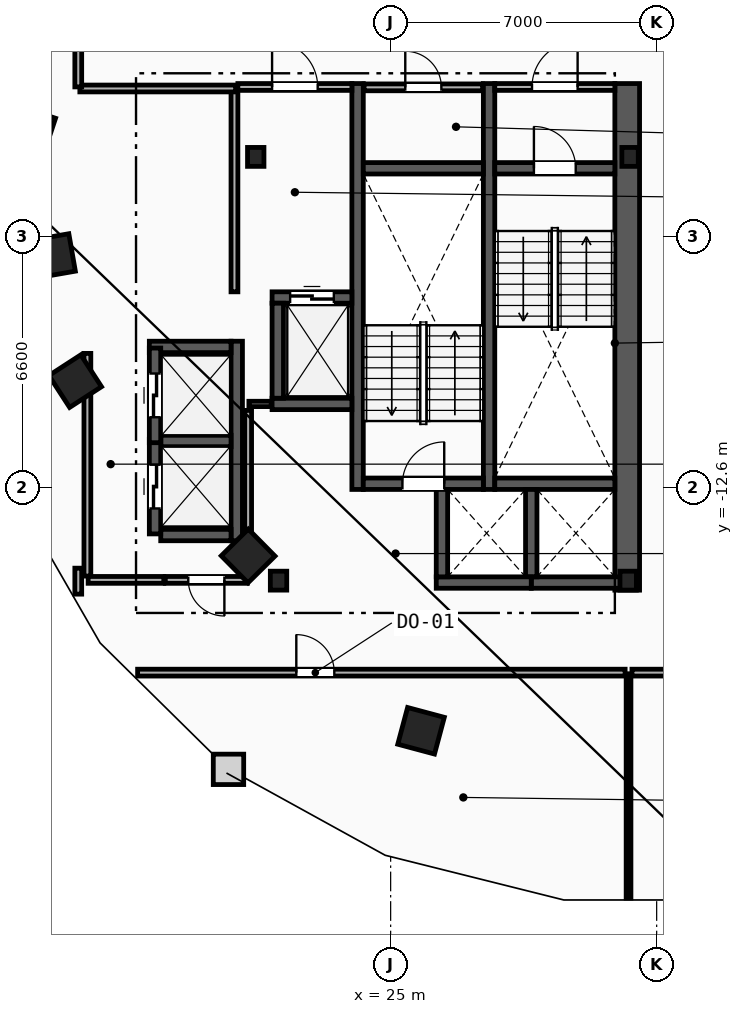
"""IFC4 building model, lengths in metres.
Left out: names, types, materials, properties, quantities, classifications, styles, units other than length and angle.
Written with IfcOpenShell. Run it as: python <this file> out.ifc"""

import sys

from ifc_helpers import new_model, si_unit, direction, frame, frame_2d, origin, origin_2d, place, context, subcontext, project, spatial, rectangle, i_section, extrude, element, fill, save


model = new_model("IFC4")
c1 = context("Model", 3, precision=1e-05, world=origin(), true_north=direction((0.0, 1.0)))
c2 = subcontext(c1, "Body", "Model", "MODEL_VIEW")
j1 = project(units=[si_unit("LENGTHUNIT", "METRE"), si_unit("PLANEANGLEUNIT", "RADIAN")], contexts=[c1])
p1 = place(None, origin())
s1 = spatial("IfcSite", under=j1, at=p1, CompositionType="ELEMENT")
p2 = place(p1, origin())
s2 = spatial("IfcBuilding", under=s1, at=p2, CompositionType="ELEMENT")
p3 = place(p2, frame((0.0, 0.0, 180.0)))
s3 = spatial("IfcBuildingStorey", under=s2, at=p3, CompositionType="ELEMENT", Elevation=180.0)
for number, where, z_axis, x_axis in (
    (1, (31.3, -3.9, 0.0), (0.0, 0.0, 1.0), (1.0, 0.0, 0.0)),
    (2, (21.45, -3.9, 0.0), (0.0, 0.0, 1.0), (1.0, 0.0, 0.0)),
    (3, (22.05, -15.05, 0.0), (0.0, 0.0, 1.0), (1.0, 0.0, 0.0)),
    (4, (31.25, -15.05, 0.0), (0.0, 0.0, 1.0), (1.0, 0.0, 0.0)),
):
    element("IfcColumn", number, at=place(p3, frame(where, z_axis=z_axis, x_axis=x_axis)), inside=s3, PredefinedType="COLUMN", context=c2, shape_type="SweptSolid", body=[
        extrude(i_section(OverallWidth=0.432, OverallDepth=0.498, WebThickness=0.056, FlangeThickness=0.089, FilletRadius=0.018, at=origin_2d()), origin(), (0.0, 0.0, 1.0), 3.6),
    ])
for number, where, z_axis, x_axis in (
    (5, (15.55, -3.2, 0.0), (0.0, 0.0, 1.0), (-0.315, -0.949, 0.0)),
    (6, (16.125, -6.5, 0.0), (0.0, 0.0, 1.0), (0.172, -0.985, 0.0)),
    (7, (16.7, -9.8, 0.0), (0.0, 0.0, 1.0), (0.544, -0.839, 0.0)),
    (8, (21.25, -14.4, 0.0), (0.0, 0.0, 1.0), (0.703, -0.711, 0.0)),
    (9, (25.8, -19.0, 0.0), (0.0, 0.0, 1.0), (0.966, -0.259, 0.0)),
):
    element("IfcColumn", number, at=place(p3, frame(where, z_axis=z_axis, x_axis=x_axis)), inside=s3, PredefinedType="COLUMN", context=c2, shape_type="SweptSolid", body=[
        extrude(rectangle(XDim=1.0, YDim=1.0, at=origin_2d()), origin(), (0.0, 0.0, 1.0), 3.6),
    ])
p4 = place(p3, frame((31.225, -15.3, 0.0), z_axis=(0.0, 0.0, 1.0), x_axis=(0.0, 1.0, 0.0)))
e10 = element("IfcWall", 10, at=p4, inside=s3, PredefinedType="SHEAR", context=c2, shape_type="SweptSolid", body=[
    extrude(rectangle(XDim=13.33, YDim=0.65, at=frame_2d((6.665, 0.0))), origin(), (0.0, 0.0, 1.0), 3.36),
])
for number, where, z_axis, x_axis in (
    (11, (27.59, -12.65, 0.0), (0.0, 0.0, 1.0), (0.0, 1.0, 0.0)),
    (12, (24.13, -12.65, 0.0), (0.0, 0.0, 1.0), (0.0, 1.0, 0.0)),
):
    element("IfcWall", number, at=place(p3, frame(where, z_axis=z_axis, x_axis=x_axis)), inside=s3, PredefinedType="SHEAR", context=c2, shape_type="SweptSolid", body=[
        extrude(rectangle(XDim=10.68, YDim=0.3, at=frame_2d((5.34, 0.0))), origin(), (0.0, 0.0, 1.0), 3.36),
    ])
p5 = place(p3, frame((27.74, -4.2, 0.0), z_axis=(0.0, 0.0, 1.0), x_axis=(1.0, 0.0, 0.0)))
e13 = element("IfcWall", 13, at=p5, inside=s3, PredefinedType="SHEAR", context=c2, shape_type="SweptSolid", body=[
    extrude(rectangle(XDim=3.16, YDim=0.3, at=frame_2d((1.58, 0.0))), origin(), (0.0, 0.0, 1.0), 3.36),
])
p6 = place(p5, frame((1.03, 0.0, 0.0)))
e14 = element("IfcOpeningElement", 14, at=p6, cuts=e13, PredefinedType="OPENING", context=c2, shape_type="SweptSolid", body=[
    extrude(rectangle(XDim=1.1, YDim=2.15, at=frame_2d((0.55, 1.075))), frame((0.0, 0.16, 0.0), z_axis=(0.0, -1.0, 0.0), x_axis=(1.0, 0.0, 0.0)), (0.0, 0.0, 1.0), 0.32),
])
p7 = place(p3, frame((27.74, -12.5, 0.0), z_axis=(0.0, 0.0, 1.0), x_axis=(1.0, 0.0, 0.0)))
e15 = element("IfcWall", 15, at=p7, inside=s3, PredefinedType="SHEAR", context=c2, shape_type="SweptSolid", body=[
    extrude(rectangle(XDim=3.16, YDim=0.3, at=frame_2d((1.58, 0.0))), origin(), (0.0, 0.0, 1.0), 3.36),
])
p8 = place(p3, frame((24.28, -12.5, 0.0), z_axis=(0.0, 0.0, 1.0), x_axis=(1.0, 0.0, 0.0)))
e16 = element("IfcWall", 16, at=p8, inside=s3, PredefinedType="SHEAR", context=c2, shape_type="SweptSolid", body=[
    extrude(rectangle(XDim=3.16, YDim=0.3, at=frame_2d((1.58, 0.0))), origin(), (0.0, 0.0, 1.0), 3.36),
])
p9 = place(p8, frame((1.03, 0.0, 0.0)))
e17 = element("IfcOpeningElement", 17, at=p9, cuts=e16, PredefinedType="OPENING", context=c2, shape_type="SweptSolid", body=[
    extrude(rectangle(XDim=1.1, YDim=2.15, at=frame_2d((0.55, 1.075))), frame((0.0, 0.16, 0.0), z_axis=(0.0, -1.0, 0.0), x_axis=(1.0, 0.0, 0.0)), (0.0, 0.0, 1.0), 0.32),
])
p10 = place(p3, frame((24.28, -4.2, 0.0), z_axis=(0.0, 0.0, 1.0), x_axis=(1.0, 0.0, 0.0)))
e18 = element("IfcWall", 18, at=p10, inside=s3, PredefinedType="SHEAR", context=c2, shape_type="SweptSolid", body=[
    extrude(rectangle(XDim=3.16, YDim=0.3, at=frame_2d((1.58, 0.0))), origin(), (0.0, 0.0, 1.0), 3.36),
])
p11 = place(p3, frame((20.89, -7.45, 0.0), z_axis=(0.0, 0.0, 1.0), x_axis=(0.0, 1.0, 0.0)))
e19 = element("IfcWall", 19, at=p11, inside=s3, PredefinedType="PARTITIONING", context=c2, shape_type="SweptSolid", body=[
    extrude(rectangle(XDim=5.3, YDim=0.18, at=frame_2d((2.65, 0.0))), origin(), (0.0, 0.0, 1.0), 3.36),
])
p12 = place(p3, frame((20.98, -2.06, 0.0), z_axis=(0.0, 0.0, 1.0), x_axis=(1.0, 0.0, 0.0)))
e20 = element("IfcWall", 20, at=p12, inside=s3, PredefinedType="PARTITIONING", context=c2, shape_type="SweptSolid", body=[
    extrude(rectangle(XDim=3.0, YDim=0.18, at=frame_2d((1.5, 0.0))), origin(), (0.0, 0.0, 1.0), 3.36),
])
p13 = place(p12, frame((0.9, 0.0, 0.0)))
e21 = element("IfcOpeningElement", 21, at=p13, cuts=e20, PredefinedType="OPENING", context=c2, shape_type="SweptSolid", body=[
    extrude(rectangle(XDim=1.2, YDim=2.15, at=frame_2d((0.6, 1.075))), frame((0.0, 0.1, 0.0), z_axis=(0.0, -1.0, 0.0), x_axis=(1.0, 0.0, 0.0)), (0.0, 0.0, 1.0), 0.2),
])
p14 = place(p3, frame((27.74, -2.06, 0.0), z_axis=(0.0, 0.0, 1.0), x_axis=(1.0, 0.0, 0.0)))
e22 = element("IfcWall", 22, at=p14, inside=s3, PredefinedType="PARTITIONING", context=c2, shape_type="SweptSolid", body=[
    extrude(rectangle(XDim=3.16, YDim=0.18, at=frame_2d((1.58, 0.0))), origin(), (0.0, 0.0, 1.0), 3.36),
])
p15 = place(p14, frame((0.98, 0.0, 0.0)))
e23 = element("IfcOpeningElement", 23, at=p15, cuts=e22, PredefinedType="OPENING", context=c2, shape_type="SweptSolid", body=[
    extrude(rectangle(XDim=1.2, YDim=2.15, at=frame_2d((0.6, 1.075))), frame((0.0, 0.1, 0.0), z_axis=(0.0, -1.0, 0.0), x_axis=(1.0, 0.0, 0.0)), (0.0, 0.0, 1.0), 0.2),
])
p16 = place(p3, frame((21.88, -7.6, 0.0), z_axis=(0.0, 0.0, 1.0), x_axis=(1.0, 0.0, 0.0)))
e24 = element("IfcWall", 24, at=p16, inside=s3, PredefinedType="SHEAR", context=c2, shape_type="SweptSolid", body=[
    extrude(rectangle(XDim=2.1, YDim=0.3, at=frame_2d((1.05, 0.0))), origin(), (0.0, 0.0, 1.0), 3.36),
])
p17 = place(p16, frame((0.475, 0.0, 0.0)))
e25 = element("IfcOpeningElement", 25, at=p17, cuts=e24, PredefinedType="OPENING", context=c2, shape_type="SweptSolid", body=[
    extrude(rectangle(XDim=1.15, YDim=2.2, at=frame_2d((0.575, 1.1))), frame((0.0, 0.16, 0.0), z_axis=(0.0, -1.0, 0.0), x_axis=(1.0, 0.0, 0.0)), (0.0, 0.0, 1.0), 0.32),
])
p18 = place(p3, frame((21.88, -10.4, 0.0), z_axis=(0.0, 0.0, 1.0), x_axis=(1.0, 0.0, 0.0)))
e26 = element("IfcWall", 26, at=p18, inside=s3, PredefinedType="SHEAR", context=c2, shape_type="SweptSolid", body=[
    extrude(rectangle(XDim=2.1, YDim=0.3, at=frame_2d((1.05, 0.0))), origin(), (0.0, 0.0, 1.0), 3.36),
])
for number, where, z_axis, x_axis in (
    (27, (22.03, -10.25, 0.0), (0.0, 0.0, 1.0), (0.0, 1.0, 0.0)),
    (28, (28.7, -15.1, 0.0), (0.0, 0.0, 1.0), (1.0, 0.0, 0.0)),
):
    element("IfcWall", number, at=place(p3, frame(where, z_axis=z_axis, x_axis=x_axis)), inside=s3, PredefinedType="SHEAR", context=c2, shape_type="SweptSolid", body=[
        extrude(rectangle(XDim=2.5, YDim=0.3, at=frame_2d((1.25, 0.0))), origin(), (0.0, 0.0, 1.0), 3.36),
    ])
p19 = place(p3, frame((28.7, -14.95, 0.0), z_axis=(0.0, 0.0, 1.0), x_axis=(0.0, 1.0, 0.0)))
e29 = element("IfcWall", 29, at=p19, inside=s3, PredefinedType="SHEAR", context=c2, shape_type="SweptSolid", body=[
    extrude(rectangle(XDim=2.3, YDim=0.3, at=frame_2d((1.15, 0.0))), origin(), (0.0, 0.0, 1.0), 3.36),
])
p20 = place(p3, frame((26.2, -15.1, 0.0), z_axis=(0.0, 0.0, 1.0), x_axis=(1.0, 0.0, 0.0)))
e30 = element("IfcWall", 30, at=p20, inside=s3, PredefinedType="SHEAR", context=c2, shape_type="SweptSolid", body=[
    extrude(rectangle(XDim=2.5, YDim=0.3, at=frame_2d((1.25, 0.0))), origin(), (0.0, 0.0, 1.0), 3.36),
])
p21 = place(p3, frame((26.35, -14.95, 0.0), z_axis=(0.0, 0.0, 1.0), x_axis=(0.0, 1.0, 0.0)))
e31 = element("IfcWall", 31, at=p21, inside=s3, PredefinedType="SHEAR", context=c2, shape_type="SweptSolid", body=[
    extrude(rectangle(XDim=2.3, YDim=0.3, at=frame_2d((1.15, 0.0))), origin(), (0.0, 0.0, 1.0), 3.36),
])
p22 = place(p3, frame((20.95, -14.0, 0.0), z_axis=(0.0, 0.0, 1.0), x_axis=(0.0, 1.0, 0.0)))
e32 = element("IfcWall", 32, at=p22, inside=s3, PredefinedType="SHEAR", context=c2, shape_type="SweptSolid", body=[
    extrude(rectangle(XDim=5.25, YDim=0.3, at=frame_2d((2.625, 0.0))), origin(), (0.0, 0.0, 1.0), 3.36),
])
p23 = place(p3, frame((18.95, -13.85, 0.0), z_axis=(0.0, 0.0, 1.0), x_axis=(1.0, 0.0, 0.0)))
e33 = element("IfcWall", 33, at=p23, inside=s3, PredefinedType="SHEAR", context=c2, shape_type="SweptSolid", body=[
    extrude(rectangle(XDim=1.85, YDim=0.3, at=frame_2d((0.925, 0.0))), origin(), (0.0, 0.0, 1.0), 3.36),
])
p24 = place(p3, frame((18.65, -8.9, 0.0), z_axis=(0.0, 0.0, 1.0), x_axis=(1.0, 0.0, 0.0)))
e34 = element("IfcWall", 34, at=p24, inside=s3, PredefinedType="SHEAR", context=c2, shape_type="SweptSolid", body=[
    extrude(rectangle(XDim=2.15, YDim=0.3, at=frame_2d((1.075, 0.0))), origin(), (0.0, 0.0, 1.0), 3.36),
])
p25 = place(p3, frame((18.95, -11.375, 0.0), z_axis=(0.0, 0.0, 1.0), x_axis=(1.0, 0.0, 0.0)))
e35 = element("IfcWall", 35, at=p25, inside=s3, PredefinedType="SHEAR", context=c2, shape_type="SweptSolid", body=[
    extrude(rectangle(XDim=1.85, YDim=0.3, at=frame_2d((0.925, 0.0))), origin(), (0.0, 0.0, 1.0), 3.36),
])
p26 = place(p3, frame((18.8, -13.82, 0.0), z_axis=(0.0, 0.0, 1.0), x_axis=(0.0, 1.0, 0.0)))
e36 = element("IfcWall", 36, at=p26, inside=s3, PredefinedType="SHEAR", context=c2, shape_type="SweptSolid", body=[
    extrude(rectangle(XDim=2.49, YDim=0.3, at=frame_2d((1.245, 0.0))), origin(), (0.0, 0.0, 1.0), 3.36),
])
p27 = place(p26, frame((0.67, 0.0, 0.0)))
e37 = element("IfcOpeningElement", 37, at=p27, cuts=e36, PredefinedType="OPENING", context=c2, shape_type="SweptSolid", body=[
    extrude(rectangle(XDim=1.15, YDim=2.2, at=frame_2d((0.575, 1.1))), frame((0.0, 0.16, 0.0), z_axis=(0.0, -1.0, 0.0), x_axis=(1.0, 0.0, 0.0)), (0.0, 0.0, 1.0), 0.32),
])
p28 = place(p3, frame((18.8, -11.42, 0.0), z_axis=(0.0, 0.0, 1.0), x_axis=(0.0, 1.0, 0.0)))
e38 = element("IfcWall", 38, at=p28, inside=s3, PredefinedType="SHEAR", context=c2, shape_type="SweptSolid", body=[
    extrude(rectangle(XDim=2.49, YDim=0.3, at=frame_2d((1.245, 0.0))), origin(), (0.0, 0.0, 1.0), 3.36),
])
p29 = place(p28, frame((0.67, 0.0, 0.0)))
e39 = element("IfcOpeningElement", 39, at=p29, cuts=e38, PredefinedType="OPENING", context=c2, shape_type="SweptSolid", body=[
    extrude(rectangle(XDim=1.15, YDim=2.2, at=frame_2d((0.575, 1.1))), frame((0.0, 0.16, 0.0), z_axis=(0.0, -1.0, 0.0), x_axis=(1.0, 0.0, 0.0)), (0.0, 0.0, 1.0), 0.32),
])
p30 = place(p3, frame((17.02, -14.93, 0.0), z_axis=(0.0, 0.0, 1.0), x_axis=(0.0, 1.0, 0.0)))
e40 = element("IfcWall", 40, at=p30, inside=s3, PredefinedType="PARTITIONING", context=c2, shape_type="SweptSolid", body=[
    extrude(rectangle(XDim=5.86, YDim=0.18, at=frame_2d((2.93, 0.0))), origin(), (0.0, 0.0, 1.0), 3.36),
])
p31 = place(p3, frame((17.04, -15.03, 0.0), z_axis=(0.0, 0.0, 1.0), x_axis=(1.0, 0.0, 0.0)))
e41 = element("IfcWall", 41, at=p31, inside=s3, PredefinedType="PARTITIONING", context=c2, shape_type="SweptSolid", body=[
    extrude(rectangle(XDim=1.99, YDim=0.18, at=frame_2d((0.995, 0.0))), origin(), (0.0, 0.0, 1.0), 3.36),
])
p32 = place(p3, frame((21.23, -15.03, 0.0), z_axis=(0.0, 0.0, 1.0), x_axis=(-1.0, 0.0, 0.0)))
e42 = element("IfcWall", 42, at=p32, inside=s3, PredefinedType="PARTITIONING", context=c2, shape_type="SweptSolid", body=[
    extrude(rectangle(XDim=2.16, YDim=0.18, at=frame_2d((1.08, 0.0))), origin(), (0.0, 0.0, 1.0), 3.36),
])
p33 = place(p32, frame((0.605, 0.0, 0.0)))
e43 = element("IfcOpeningElement", 43, at=p33, cuts=e42, PredefinedType="OPENING", context=c2, shape_type="SweptSolid", body=[
    extrude(rectangle(XDim=0.95, YDim=2.1, at=frame_2d((0.475, 1.05))), frame((0.0, 0.1, 0.0), z_axis=(0.0, -1.0, 0.0), x_axis=(1.0, 0.0, 0.0)), (0.0, 0.0, 1.0), 0.2),
])
p34 = place(p3, frame((21.27, -10.4, 0.0), z_axis=(0.0, 0.0, 1.0), x_axis=(1.0, 0.0, 0.0)))
e44 = element("IfcWall", 44, at=p34, inside=s3, PredefinedType="PARTITIONING", context=c2, shape_type="SweptSolid", body=[
    extrude(rectangle(XDim=0.59, YDim=0.14, at=frame_2d((0.295, 0.0))), origin(), (0.0, 0.0, 1.0), 3.36),
])
p35 = place(p3, frame((21.25, -14.93, 0.0), z_axis=(0.0, 0.0, 1.0), x_axis=(0.0, 1.0, 0.0)))
e45 = element("IfcWall", 45, at=p35, inside=s3, PredefinedType="PARTITIONING", context=c2, shape_type="SweptSolid", body=[
    extrude(rectangle(XDim=4.36, YDim=0.18, at=frame_2d((2.18, 0.0))), origin(), (0.0, 0.0, 1.0), 3.36),
])
p36 = place(p3, frame((24.3, -2.07, 0.0), z_axis=(0.0, 0.0, 1.0), x_axis=(1.0, 0.0, 0.0)))
e46 = element("IfcWall", 46, at=p36, inside=s3, PredefinedType="PARTITIONING", context=c2, shape_type="SweptSolid", body=[
    extrude(rectangle(XDim=3.12, YDim=0.18, at=frame_2d((1.56, 0.0))), origin(), (0.0, 0.0, 1.0), 3.36),
])
p37 = place(p36, frame((1.085, 0.0, 0.0)))
e47 = element("IfcOpeningElement", 47, at=p37, cuts=e46, PredefinedType="OPENING", context=c2, shape_type="SweptSolid", body=[
    extrude(rectangle(XDim=0.95, YDim=2.1, at=frame_2d((0.475, 1.05))), frame((0.0, 0.1, 0.0), z_axis=(0.0, -1.0, 0.0), x_axis=(1.0, 0.0, 0.0)), (0.0, 0.0, 1.0), 0.2),
])
p38 = place(p3, frame((31.26, -23.402, 0.0), z_axis=(0.0, 0.0, 1.0), x_axis=(0.0, 1.0, 0.0)))
e48 = element("IfcWall", 48, at=p38, inside=s3, PredefinedType="PARTITIONING", context=c2, shape_type="SweptSolid", body=[
    extrude(rectangle(XDim=5.902, YDim=0.125, at=frame_2d((2.951, 0.0))), origin(), (0.0, 0.0, 1.0), 3.36),
])
p39 = place(p3, frame((18.342, -17.47, 0.0), z_axis=(0.0, 0.0, 1.0), x_axis=(1.0, 0.0, 0.0)))
e49 = element("IfcWall", 49, at=p39, inside=s3, PredefinedType="PARTITIONING", context=c2, shape_type="SweptSolid", body=[
    extrude(rectangle(XDim=12.828, YDim=0.18, at=frame_2d((6.414, 0.0))), origin(), (0.0, 0.0, 1.0), 3.36),
])
p40 = place(p39, frame((4.176, 0.0, 0.0)))
e50 = element("IfcOpeningElement", 50, at=p40, cuts=e49, PredefinedType="OPENING", context=c2, shape_type="SweptSolid", body=[
    extrude(rectangle(XDim=1.0, YDim=2.15, at=frame_2d((0.5, 1.075))), frame((0.0, 0.1, 0.0), z_axis=(0.0, -1.0, 0.0), x_axis=(1.0, 0.0, 0.0)), (0.0, 0.0, 1.0), 0.2),
])
p41 = place(p3, frame((16.822, -2.1, 0.0), z_axis=(0.0, 0.0, 1.0), x_axis=(1.0, 0.0, 0.0)))
e51 = element("IfcWall", 51, at=p41, inside=s3, PredefinedType="PARTITIONING", context=c2, shape_type="SweptSolid", body=[
    extrude(rectangle(XDim=4.098, YDim=0.18, at=frame_2d((2.049, 0.0))), origin(), (0.0, 0.0, 1.0), 3.36),
])
p42 = place(p3, frame((16.78, 0.329, 0.0), z_axis=(0.0, 0.0, 1.0), x_axis=(0.0, -1.0, 0.0)))
e52 = element("IfcWall", 52, at=p42, inside=s3, PredefinedType="PARTITIONING", context=c2, shape_type="SweptSolid", body=[
    extrude(rectangle(XDim=2.387, YDim=0.18, at=frame_2d((1.194, 0.0))), origin(), (0.0, 0.0, 1.0), 3.36),
])
p43 = place(p3, frame((16.78, -14.721, 0.0), z_axis=(0.0, 0.0, 1.0), x_axis=(0.0, -1.0, 0.0)))
e53 = element("IfcWall", 53, at=p43, inside=s3, PredefinedType="PARTITIONING", context=c2, shape_type="SweptSolid", body=[
    extrude(rectangle(XDim=0.684, YDim=0.18, at=frame_2d((0.342, 0.0))), origin(), (0.0, 0.0, 1.0), 3.36),
])
p44 = place(p3, frame((31.35, -17.47, 0.0), z_axis=(0.0, 0.0, 1.0), x_axis=(1.0, 0.0, 0.0)))
e54 = element("IfcWall", 54, at=p44, inside=s3, PredefinedType="PARTITIONING", context=c2, shape_type="SweptSolid", body=[
    extrude(rectangle(XDim=2.278, YDim=0.18, at=frame_2d((1.139, 0.0))), origin(), (0.0, 0.0, 1.0), 3.36),
])
p45 = place(p6, origin())
e55 = element("IfcDoor", 55, at=p45, inside=s3, OperationType="SINGLE_SWING_LEFT", PredefinedType="DOOR", context=c2, shape_type="SweptSolid", body=[
    extrude(rectangle(XDim=1.1, YDim=2.15, at=frame_2d((0.55, 1.075))), frame((0.0, 0.025, 0.0), z_axis=(0.0, -1.0, 0.0), x_axis=(1.0, 0.0, 0.0)), (0.0, 0.0, 1.0), 0.05),
])
fill(e14, e55)
p46 = place(p9, origin())
e56 = element("IfcDoor", 56, at=p46, inside=s3, OperationType="SINGLE_SWING_RIGHT", PredefinedType="DOOR", context=c2, shape_type="SweptSolid", body=[
    extrude(rectangle(XDim=1.1, YDim=2.15, at=frame_2d((0.55, 1.075))), frame((0.0, 0.025, 0.0), z_axis=(0.0, -1.0, 0.0), x_axis=(1.0, 0.0, 0.0)), (0.0, 0.0, 1.0), 0.05),
])
fill(e17, e56)
p47 = place(p13, origin())
e57 = element("IfcDoor", 57, at=p47, inside=s3, OperationType="SINGLE_SWING_LEFT", PredefinedType="DOOR", context=c2, shape_type="SweptSolid", body=[
    extrude(rectangle(XDim=1.2, YDim=2.15, at=frame_2d((0.6, 1.075))), frame((0.0, 0.025, 0.0), z_axis=(0.0, -1.0, 0.0), x_axis=(1.0, 0.0, 0.0)), (0.0, 0.0, 1.0), 0.05),
])
fill(e21, e57)
p48 = place(p15, origin())
e58 = element("IfcDoor", 58, at=p48, inside=s3, OperationType="SINGLE_SWING_RIGHT", PredefinedType="DOOR", context=c2, shape_type="SweptSolid", body=[
    extrude(rectangle(XDim=1.2, YDim=2.15, at=frame_2d((0.6, 1.075))), frame((0.0, 0.025, 0.0), z_axis=(0.0, -1.0, 0.0), x_axis=(1.0, 0.0, 0.0)), (0.0, 0.0, 1.0), 0.05),
])
fill(e23, e58)
p49 = place(p17, origin())
e59 = element("IfcDoor", 59, at=p49, inside=s3, OperationType="SLIDING_TO_LEFT", PredefinedType="TRAPDOOR", context=c2, shape_type="SweptSolid", body=[
    extrude(rectangle(XDim=1.15, YDim=2.2, at=frame_2d((0.575, 1.1))), frame((0.0, 0.025, 0.0), z_axis=(0.0, -1.0, 0.0), x_axis=(1.0, 0.0, 0.0)), (0.0, 0.0, 1.0), 0.05),
])
fill(e25, e59)
p50 = place(p27, origin())
e60 = element("IfcDoor", 60, at=p50, inside=s3, OperationType="SLIDING_TO_LEFT", PredefinedType="TRAPDOOR", context=c2, shape_type="SweptSolid", body=[
    extrude(rectangle(XDim=1.15, YDim=2.2, at=frame_2d((0.575, 1.1))), frame((0.0, 0.025, 0.0), z_axis=(0.0, -1.0, 0.0), x_axis=(1.0, 0.0, 0.0)), (0.0, 0.0, 1.0), 0.05),
])
fill(e37, e60)
p51 = place(p29, origin())
e61 = element("IfcDoor", 61, at=p51, inside=s3, OperationType="SLIDING_TO_LEFT", PredefinedType="TRAPDOOR", context=c2, shape_type="SweptSolid", body=[
    extrude(rectangle(XDim=1.15, YDim=2.2, at=frame_2d((0.575, 1.1))), frame((0.0, 0.025, 0.0), z_axis=(0.0, -1.0, 0.0), x_axis=(1.0, 0.0, 0.0)), (0.0, 0.0, 1.0), 0.05),
])
fill(e39, e61)
p52 = place(p40, origin())
e62 = element("IfcDoor", 62, at=p52, inside=s3, OperationType="SINGLE_SWING_LEFT", PredefinedType="DOOR", context=c2, shape_type="SweptSolid", body=[
    extrude(rectangle(XDim=1.0, YDim=2.15, at=frame_2d((0.5, 1.075))), frame((0.0, 0.025, 0.0), z_axis=(0.0, -1.0, 0.0), x_axis=(1.0, 0.0, 0.0)), (0.0, 0.0, 1.0), 0.05),
])
fill(e50, e62)
p53 = place(p37, origin())
e63 = element("IfcDoor", 63, at=p53, inside=s3, OperationType="SINGLE_SWING_LEFT", PredefinedType="DOOR", context=c2, shape_type="SweptSolid", body=[
    extrude(rectangle(XDim=0.95, YDim=2.1, at=frame_2d((0.475, 1.05))), frame((0.0, 0.025, 0.0), z_axis=(0.0, -1.0, 0.0), x_axis=(1.0, 0.0, 0.0)), (0.0, 0.0, 1.0), 0.05),
])
fill(e47, e63)
p54 = place(p33, origin())
e64 = element("IfcDoor", 64, at=p54, inside=s3, OperationType="SINGLE_SWING_LEFT", PredefinedType="DOOR", context=c2, shape_type="SweptSolid", body=[
    extrude(rectangle(XDim=0.95, YDim=2.1, at=frame_2d((0.475, 1.05))), frame((0.0, 0.025, 0.0), z_axis=(0.0, -1.0, 0.0), x_axis=(1.0, 0.0, 0.0)), (0.0, 0.0, 1.0), 0.05),
])
fill(e43, e64)
save(model, sys.argv[1])
